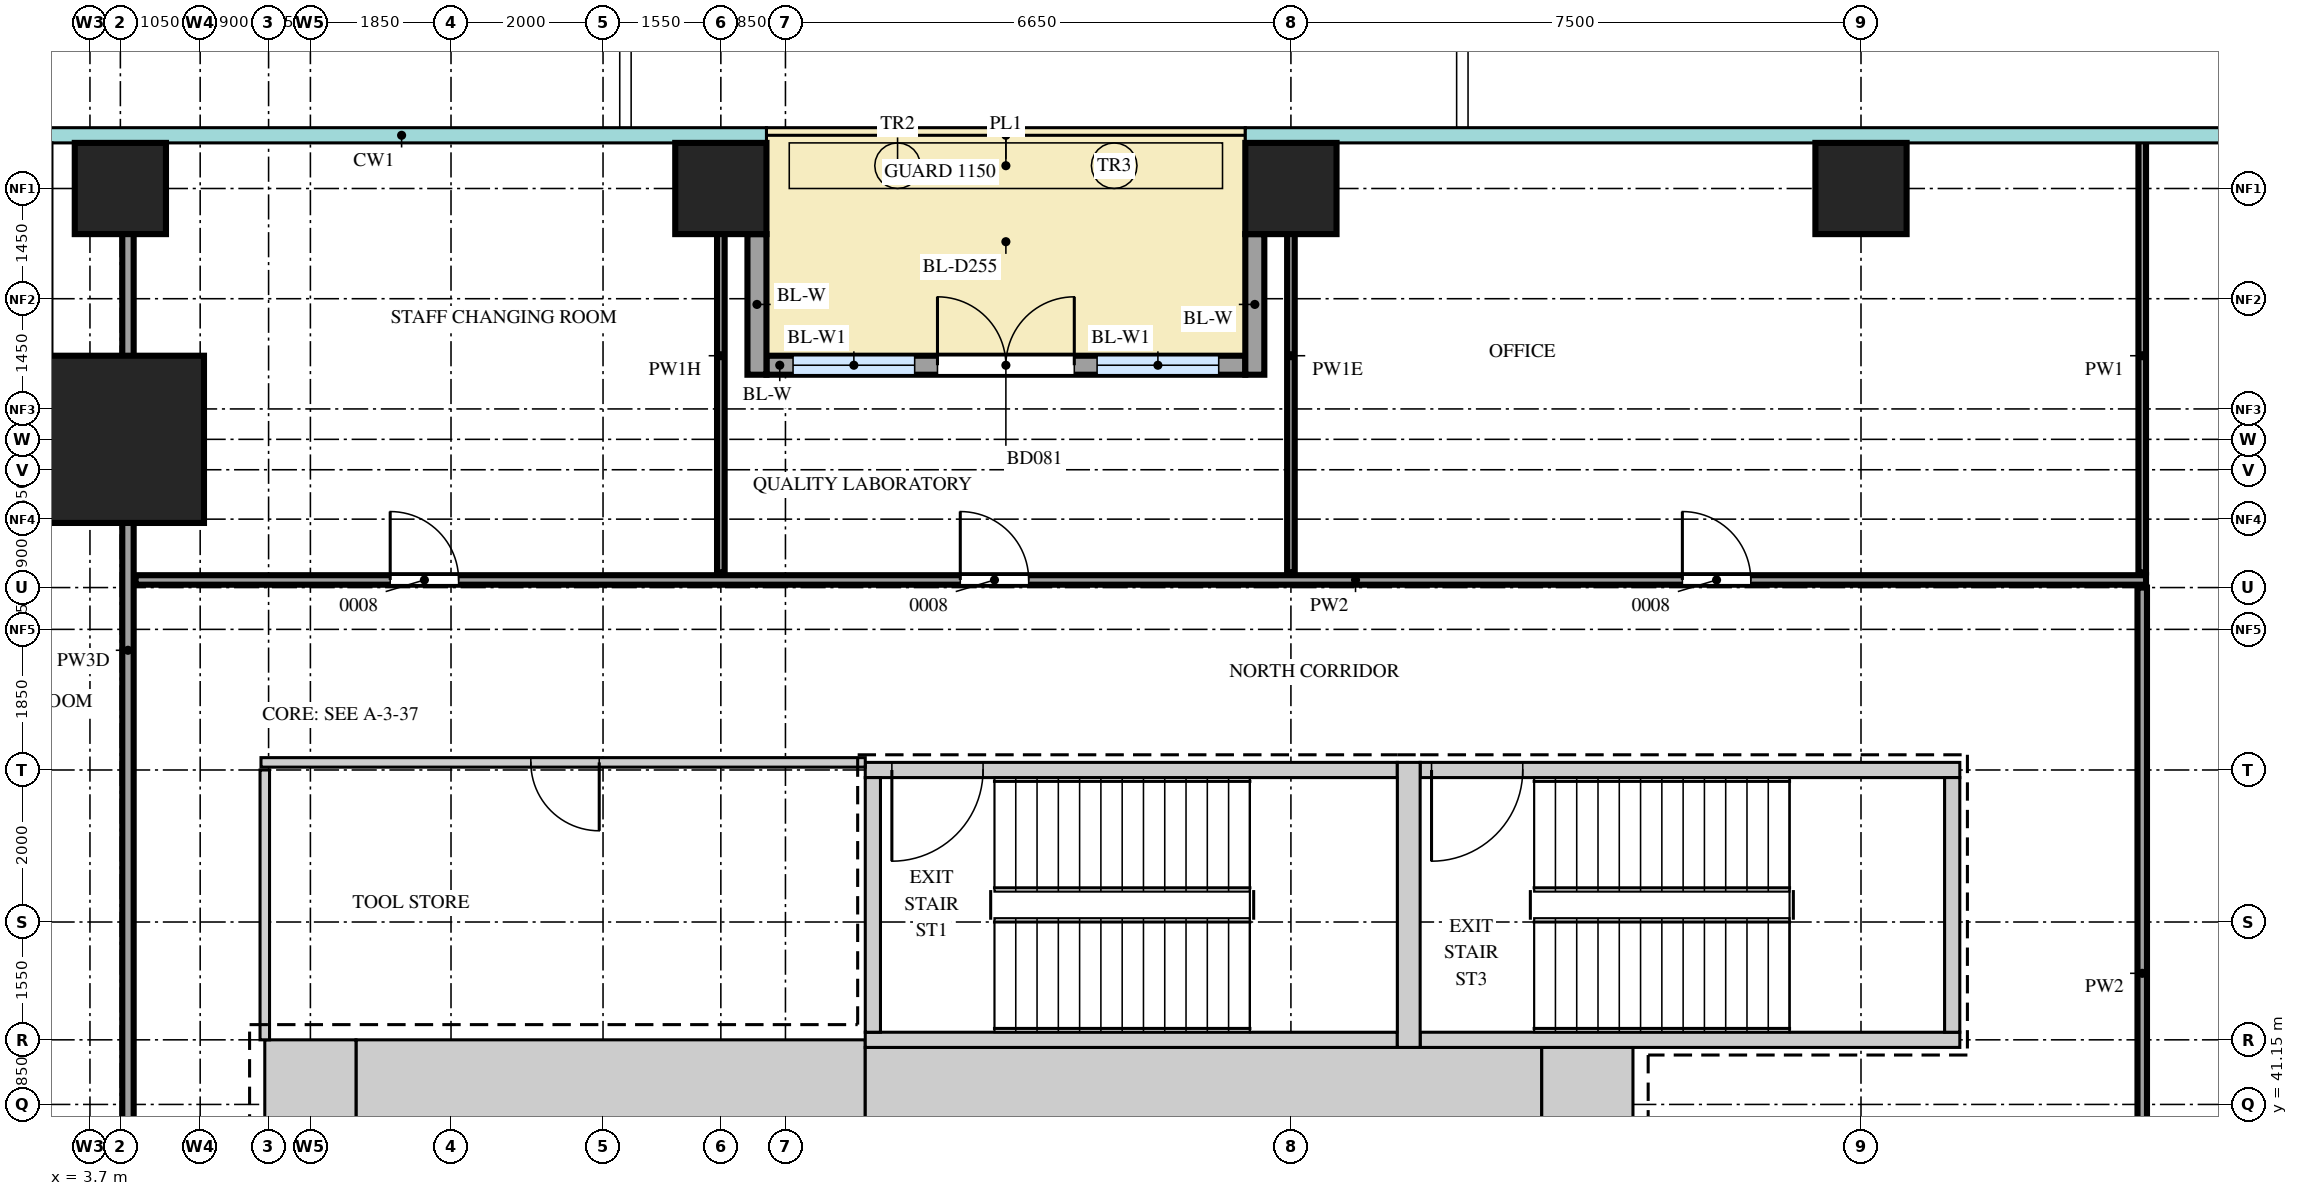
"""IFC4 building model, lengths in metres.
Left out: names, types, materials, properties, quantities, classifications, styles, units other than length and angle.
Written with IfcOpenShell. Run it as: python <this file> out.ifc"""

import sys

from ifc_helpers import new_model, si_unit, direction, frame, frame_2d, origin, origin_2d, place, context, subcontext, project, spatial, rectangle, extrude, source, transform, mapped, element, fill, save


model = new_model("IFC4")
c1 = context("Model", 3, precision=1e-05, world=origin(), true_north=direction((0.0, 1.0)))
c2 = subcontext(c1, "Body", "Model", "MODEL_VIEW")
j1 = project(units=[si_unit("LENGTHUNIT", "METRE"), si_unit("PLANEANGLEUNIT", "RADIAN")], contexts=[c1])
p1 = place(None, origin())
s1 = spatial("IfcSite", under=j1, at=p1, CompositionType="ELEMENT")
p2 = place(p1, origin())
s2 = spatial("IfcBuilding", under=s1, at=p2, CompositionType="ELEMENT")
p3 = place(p2, frame((0.0, 0.0, 42.0)))
s3 = spatial("IfcBuildingStorey", under=s2, at=p3, CompositionType="ELEMENT", Elevation=42.0)
m1 = source(origin(), c2, "Body", "SweptSolid", [
    extrude(rectangle(XDim=6.7, YDim=1.2, at=frame_2d((3.35, 0.0))), origin(), (0.0, 0.0, 1.0), 4.2),
])
p4 = place(p3, frame((7.2, 41.4, 0.0), z_axis=(0.0, 0.0, 1.0), x_axis=(1.0, 0.0, 0.0)))
e1 = element("IfcWall", 1, at=p4, inside=s3, PredefinedType="SHEAR", context=c2, shape_type="MappedRepresentation", body=[
    mapped(m1, transform((0.0, 0.0, 0.0))),
])
m2 = source(origin(), c2, "Body", "SweptSolid", [
    extrude(rectangle(XDim=8.9, YDim=1.1, at=frame_2d((4.45, 0.0))), origin(), (0.0, 0.0, 1.0), 4.2),
])
p5 = place(p3, frame((13.9, 41.35, 0.0), z_axis=(0.0, 0.0, 1.0), x_axis=(1.0, 0.0, 0.0)))
e2 = element("IfcWall", 2, at=p5, inside=s3, PredefinedType="SHEAR", context=c2, shape_type="MappedRepresentation", body=[
    mapped(m2, transform((0.0, 0.0, 0.0))),
])
m3 = source(origin(), c2, "Body", "SweptSolid", [
    extrude(rectangle(XDim=1.2, YDim=1.1, at=frame_2d((0.6, 0.0))), origin(), (0.0, 0.0, 1.0), 4.2),
])
p6 = place(p3, frame((22.8, 41.35, 0.0), z_axis=(0.0, 0.0, 1.0), x_axis=(1.0, 0.0, 0.0)))
e3 = element("IfcWall", 3, at=p6, inside=s3, PredefinedType="SHEAR", context=c2, shape_type="MappedRepresentation", body=[
    mapped(m3, transform((0.0, 0.0, 0.0))),
])
m4 = source(origin(), c2, "Body", "SweptSolid", [
    extrude(rectangle(XDim=1.2, YDim=1.2, at=frame_2d((0.6, 0.0))), origin(), (0.0, 0.0, 1.0), 4.2),
])
p7 = place(p3, frame((6.0, 41.4, 0.0), z_axis=(0.0, 0.0, 1.0), x_axis=(1.0, 0.0, 0.0)))
e4 = element("IfcWall", 4, at=p7, inside=s3, PredefinedType="SHEAR", context=c2, shape_type="MappedRepresentation", body=[
    mapped(m4, transform((0.0, 0.0, 0.0))),
])
m5 = source(origin(), c2, "Body", "SweptSolid", [
    extrude(rectangle(XDim=7.0, YDim=0.2, at=frame_2d((3.5, 0.0))), origin(), (0.0, 0.0, 1.0), 4.2),
])
p8 = place(p3, frame((13.9, 45.55, 0.0), z_axis=(0.0, 0.0, 1.0), x_axis=(1.0, 0.0, 0.0)))
e5 = element("IfcWall", 5, at=p8, inside=s3, PredefinedType="SHEAR", context=c2, shape_type="MappedRepresentation", body=[
    mapped(m5, transform((0.0, 0.0, 0.0))),
])
m6 = source(origin(), c2, "Body", "SweptSolid", [
    extrude(rectangle(XDim=1.2, YDim=2.1, at=frame_2d((0.6, 1.05))), frame((0.0, 0.11, 0.0), z_axis=(0.0, -1.0, 0.0), x_axis=(1.0, 0.0, 0.0)), (0.0, 0.0, 1.0), 0.22),
])
p9 = place(p8, frame((0.35, 0.0, 0.0)))
e6 = element("IfcOpeningElement", 6, at=p9, cuts=e5, PredefinedType="OPENING", context=c2, shape_type="MappedRepresentation", body=[
    mapped(m6, transform((0.0, 0.0, 0.0))),
])
p10 = place(p3, frame((13.9, 42.0, 0.0), z_axis=(0.0, 0.0, 1.0), x_axis=(1.0, 0.0, 0.0)))
e7 = element("IfcWall", 7, at=p10, inside=s3, PredefinedType="SHEAR", context=c2, shape_type="MappedRepresentation", body=[
    mapped(m5, transform((0.0, 0.0, 0.0))),
])
m7 = source(origin(), c2, "Body", "SweptSolid", [
    extrude(rectangle(XDim=7.1, YDim=0.2, at=frame_2d((3.55, 0.0))), origin(), (0.0, 0.0, 1.0), 4.2),
])
p11 = place(p3, frame((21.2, 45.55, 0.0), z_axis=(0.0, 0.0, 1.0), x_axis=(1.0, 0.0, 0.0)))
e8 = element("IfcWall", 8, at=p11, inside=s3, PredefinedType="SHEAR", context=c2, shape_type="MappedRepresentation", body=[
    mapped(m7, transform((0.0, 0.0, 0.0))),
])
p12 = place(p11, frame((0.15, 0.0, 0.0)))
e9 = element("IfcOpeningElement", 9, at=p12, cuts=e8, PredefinedType="OPENING", context=c2, shape_type="MappedRepresentation", body=[
    mapped(m6, transform((0.0, 0.0, 0.0))),
])
p13 = place(p3, frame((21.2, 42.0, 0.0), z_axis=(0.0, 0.0, 1.0), x_axis=(1.0, 0.0, 0.0)))
e10 = element("IfcWall", 10, at=p13, inside=s3, PredefinedType="SHEAR", context=c2, shape_type="MappedRepresentation", body=[
    mapped(m7, transform((0.0, 0.0, 0.0))),
])
m8 = source(origin(), c2, "Body", "SweptSolid", [
    extrude(rectangle(XDim=3.75, YDim=0.3, at=frame_2d((1.875, 0.0))), origin(), (0.0, 0.0, 1.0), 4.2),
])
p14 = place(p3, frame((21.05, 41.9, 0.0), z_axis=(0.0, 0.0, 1.0), x_axis=(0.0, 1.0, 0.0)))
e11 = element("IfcWall", 11, at=p14, inside=s3, PredefinedType="SHEAR", context=c2, shape_type="MappedRepresentation", body=[
    mapped(m8, transform((0.0, 0.0, 0.0))),
])
m9 = source(origin(), c2, "Body", "SweptSolid", [
    extrude(rectangle(XDim=3.35, YDim=0.2, at=frame_2d((1.675, 0.0))), origin(), (0.0, 0.0, 1.0), 4.2),
])
for number, where, z_axis, x_axis in (
    (12, (14.0, 42.1, 0.0), (0.0, 0.0, 1.0), (0.0, 1.0, 0.0)),
    (13, (28.2, 42.1, 0.0), (0.0, 0.0, 1.0), (0.0, 1.0, 0.0)),
):
    element("IfcWall", number, at=place(p3, frame(where, z_axis=z_axis, x_axis=x_axis)), inside=s3, PredefinedType="SHEAR", context=c2, shape_type="MappedRepresentation", body=[
        mapped(m9, transform((0.0, 0.0, 0.0))),
    ])
m10 = source(origin(), c2, "Body", "SweptSolid", [
    extrude(rectangle(XDim=2.2, YDim=2.2, at=origin_2d()), origin(), (0.0, 0.0, 1.0), 4.5),
])
p15 = place(p3, frame((4.1, 49.9, 0.0), z_axis=(0.0, 0.0, 1.0), x_axis=(1.0, 0.0, 0.0)))
e14 = element("IfcColumn", 14, at=p15, inside=s3, PredefinedType="COLUMN", context=c2, shape_type="MappedRepresentation", body=[
    mapped(m10, transform((0.0, 0.0, 0.0))),
])
m11 = source(origin(), c2, "Body", "SweptSolid", [
    extrude(rectangle(XDim=1.2, YDim=1.2, at=origin_2d()), origin(), (0.0, 0.0, 1.0), 4.2),
])
for number, where, z_axis, x_axis in (
    (15, (4.1, 53.2, 0.0), (0.0, 0.0, 1.0), (1.0, 0.0, 0.0)),
    (16, (12.0, 53.2, 0.0), (0.0, 0.0, 1.0), (1.0, 0.0, 0.0)),
    (17, (19.5, 53.2, 0.0), (0.0, 0.0, 1.0), (1.0, 0.0, 0.0)),
    (18, (27.0, 53.2, 0.0), (0.0, 0.0, 1.0), (1.0, 0.0, 0.0)),
):
    element("IfcColumn", number, at=place(p3, frame(where, z_axis=z_axis, x_axis=x_axis)), inside=s3, PredefinedType="COLUMN", context=c2, shape_type="MappedRepresentation", body=[
        mapped(m11, transform((0.0, 0.0, 0.0))),
    ])
m12 = source(origin(), c2, "Body", "SweptSolid", [
    extrude(rectangle(XDim=6.3, YDim=0.25, at=frame_2d((3.15, 0.0))), origin(), (0.0, 0.0, 1.0), 4.2),
])
p16 = place(p3, frame((12.6, 50.875, 0.0), z_axis=(0.0, 0.0, 1.0), x_axis=(1.0, 0.0, 0.0)))
e19 = element("IfcWall", 19, at=p16, inside=s3, PredefinedType="SOLIDWALL", context=c2, shape_type="MappedRepresentation", body=[
    mapped(m12, transform((0.0, 0.0, 0.0))),
])
m13 = source(origin(), c2, "Body", "SweptSolid", [
    extrude(rectangle(XDim=1.6, YDim=2.4, at=frame_2d((0.8, 1.2))), frame((0.0, 0.135, 0.0), z_axis=(0.0, -1.0, 0.0), x_axis=(1.0, 0.0, 0.0)), (0.0, 0.0, 1.0), 0.27),
])
p17 = place(p16, frame((0.35, 0.0, 0.0)))
e20 = element("IfcOpeningElement", 20, at=p17, cuts=e19, PredefinedType="OPENING", context=c2, shape_type="MappedRepresentation", body=[
    mapped(m13, transform((0.0, 0.0, 0.0))),
])
p18 = place(p16, frame((4.35, 0.0, 0.0)))
e21 = element("IfcOpeningElement", 21, at=p18, cuts=e19, PredefinedType="OPENING", context=c2, shape_type="MappedRepresentation", body=[
    mapped(m13, transform((0.0, 0.0, 0.0))),
])
m14 = source(origin(), c2, "Body", "SweptSolid", [
    extrude(rectangle(XDim=1.8, YDim=2.4, at=frame_2d((0.9, 1.2))), frame((0.0, 0.135, 0.0), z_axis=(0.0, -1.0, 0.0), x_axis=(1.0, 0.0, 0.0)), (0.0, 0.0, 1.0), 0.27),
])
p19 = place(p16, frame((2.25, 0.0, 0.0)))
e22 = element("IfcOpeningElement", 22, at=p19, cuts=e19, PredefinedType="OPENING", context=c2, shape_type="MappedRepresentation", body=[
    mapped(m14, transform((0.0, 0.0, 0.0))),
])
m15 = source(origin(), c2, "Body", "SweptSolid", [
    extrude(rectangle(XDim=1.85, YDim=0.25, at=frame_2d((0.925, 0.0))), origin(), (0.0, 0.0, 1.0), 4.2),
])
for number, where, z_axis, x_axis in (
    (23, (12.475, 52.6, 0.0), (0.0, 0.0, 1.0), (0.0, -1.0, 0.0)),
    (24, (19.025, 52.6, 0.0), (0.0, 0.0, 1.0), (0.0, -1.0, 0.0)),
):
    element("IfcWall", number, at=place(p3, frame(where, z_axis=z_axis, x_axis=x_axis)), inside=s3, PredefinedType="SOLIDWALL", context=c2, shape_type="MappedRepresentation", body=[
        mapped(m15, transform((0.0, 0.0, 0.0))),
    ])
m16 = source(origin(), c2, "Body", "SweptSolid", [
    extrude(rectangle(XDim=19.75, YDim=0.15, at=frame_2d((9.875, 0.0))), origin(), (0.0, 0.0, 1.0), 3.6),
])
p20 = place(p3, frame((4.2, 34.1, 0.0), z_axis=(0.0, 0.0, 1.0), x_axis=(0.0, 1.0, 0.0)))
e25 = element("IfcWall", 25, at=p20, inside=s3, PredefinedType="PARTITIONING", context=c2, shape_type="MappedRepresentation", body=[
    mapped(m16, transform((0.0, 0.0, 0.0))),
])
m17 = source(origin(), c2, "Body", "SweptSolid", [
    extrude(rectangle(XDim=0.9, YDim=2.1, at=frame_2d((0.45, 1.05))), frame((0.0, 0.085, 0.0), z_axis=(0.0, -1.0, 0.0), x_axis=(1.0, 0.0, 0.0)), (0.0, 0.0, 1.0), 0.17),
])
p21 = place(p20, frame((5.4, 0.0, 0.0)))
e26 = element("IfcOpeningElement", 26, at=p21, cuts=e25, PredefinedType="OPENING", context=c2, shape_type="MappedRepresentation", body=[
    mapped(m17, transform((0.0, 0.0, 0.0))),
])
m18 = source(origin(), c2, "Body", "SweptSolid", [
    extrude(rectangle(XDim=10.15, YDim=0.125, at=frame_2d((5.075, 0.0))), origin(), (0.0, 0.0, 1.0), 4.3),
])
p22 = place(p3, frame((30.7, 37.8, 0.0), z_axis=(0.0, 0.0, 1.0), x_axis=(0.0, 1.0, 0.0)))
e27 = element("IfcWall", 27, at=p22, inside=s3, PredefinedType="PARTITIONING", context=c2, shape_type="MappedRepresentation", body=[
    mapped(m18, transform((0.0, 0.0, 0.0))),
])
m19 = source(origin(), c2, "Body", "SweptSolid", [
    extrude(rectangle(XDim=3.55, YDim=0.125, at=frame_2d((1.775, 0.0))), origin(), (0.0, 0.0, 1.0), 4.3),
])
p23 = place(p3, frame((6.0, 42.0, 0.0), z_axis=(0.0, 0.0, 1.0), x_axis=(0.0, 1.0, 0.0)))
e28 = element("IfcWall", 28, at=p23, inside=s3, PredefinedType="PARTITIONING", context=c2, shape_type="MappedRepresentation", body=[
    mapped(m19, transform((0.0, 0.0, 0.0))),
])
m20 = source(origin(), c2, "Body", "SweptSolid", [
    extrude(rectangle(XDim=7.95, YDim=0.125, at=frame_2d((3.975, 0.0))), origin(), (0.0, 0.0, 1.0), 4.3),
])
p24 = place(p3, frame((5.95, 45.65, 0.0), z_axis=(0.0, 0.0, 1.0), x_axis=(1.0, 0.0, 0.0)))
e29 = element("IfcWall", 29, at=p24, inside=s3, PredefinedType="PARTITIONING", context=c2, shape_type="MappedRepresentation", body=[
    mapped(m20, transform((0.0, 0.0, 0.0))),
])
m21 = source(origin(), c2, "Body", "SweptSolid", [
    extrude(rectangle(XDim=0.9, YDim=2.1, at=frame_2d((0.45, 1.05))), frame((0.0, 0.073, 0.0), z_axis=(0.0, -1.0, 0.0), x_axis=(1.0, 0.0, 0.0)), (0.0, 0.0, 1.0), 0.145),
])
p25 = place(p24, frame((3.55, 0.0, 0.0)))
e30 = element("IfcOpeningElement", 30, at=p25, cuts=e29, PredefinedType="OPENING", context=c2, shape_type="MappedRepresentation", body=[
    mapped(m21, transform((0.0, 0.0, 0.0))),
])
m22 = source(origin(), c2, "Body", "SweptSolid", [
    extrude(rectangle(XDim=26.45, YDim=0.125, at=frame_2d((13.225, 0.0))), origin(), (0.0, 0.0, 1.0), 4.3),
])
p26 = place(p3, frame((4.3, 48.05, 0.0), z_axis=(0.0, 0.0, 1.0), x_axis=(1.0, 0.0, 0.0)))
e31 = element("IfcWall", 31, at=p26, inside=s3, PredefinedType="PARTITIONING", context=c2, shape_type="MappedRepresentation", body=[
    mapped(m22, transform((0.0, 0.0, 0.0))),
])
p27 = place(p26, frame((3.35, 0.0, 0.0)))
e32 = element("IfcOpeningElement", 32, at=p27, cuts=e31, PredefinedType="OPENING", context=c2, shape_type="MappedRepresentation", body=[
    mapped(m21, transform((0.0, 0.0, 0.0))),
])
p28 = place(p26, frame((10.85, 0.0, 0.0)))
e33 = element("IfcOpeningElement", 33, at=p28, cuts=e31, PredefinedType="OPENING", context=c2, shape_type="MappedRepresentation", body=[
    mapped(m21, transform((0.0, 0.0, 0.0))),
])
p29 = place(p26, frame((20.35, 0.0, 0.0)))
e34 = element("IfcOpeningElement", 34, at=p29, cuts=e31, PredefinedType="OPENING", context=c2, shape_type="MappedRepresentation", body=[
    mapped(m21, transform((0.0, 0.0, 0.0))),
])
m23 = source(origin(), c2, "Body", "SweptSolid", [
    extrude(rectangle(XDim=5.7, YDim=0.1, at=frame_2d((2.85, 0.0))), origin(), (0.0, 0.0, 1.0), 3.7),
])
p30 = place(p3, frame((12.0, 48.15, 0.0), z_axis=(0.0, 0.0, 1.0), x_axis=(0.0, 1.0, 0.0)))
e35 = element("IfcWall", 35, at=p30, inside=s3, PredefinedType="PARTITIONING", context=c2, shape_type="MappedRepresentation", body=[
    mapped(m23, transform((0.0, 0.0, 0.0))),
])
m24 = source(origin(), c2, "Body", "SweptSolid", [
    extrude(rectangle(XDim=5.7, YDim=0.1, at=frame_2d((2.85, 0.0))), origin(), (0.0, 0.0, 1.0), 3.84),
])
p31 = place(p3, frame((19.5, 48.15, 0.0), z_axis=(0.0, 0.0, 1.0), x_axis=(0.0, 1.0, 0.0)))
e36 = element("IfcWall", 36, at=p31, inside=s3, PredefinedType="PARTITIONING", context=c2, shape_type="MappedRepresentation", body=[
    mapped(m24, transform((0.0, 0.0, 0.0))),
])
m25 = source(origin(), c2, "Body", "SweptSolid", [
    extrude(rectangle(XDim=5.7, YDim=0.1, at=frame_2d((2.85, 0.0))), origin(), (0.0, 0.0, 1.0), 4.3),
])
p32 = place(p3, frame((30.7, 48.15, 0.0), z_axis=(0.0, 0.0, 1.0), x_axis=(0.0, 1.0, 0.0)))
e37 = element("IfcWall", 37, at=p32, inside=s3, PredefinedType="PARTITIONING", context=c2, shape_type="MappedRepresentation", body=[
    mapped(m25, transform((0.0, 0.0, 0.0))),
])
m26 = source(origin(), c2, "Body", "SweptSolid", [
    extrude(rectangle(XDim=1.6, YDim=2.4, at=frame_2d((0.8, 1.2))), frame((0.0, 0.03, 0.0), z_axis=(0.0, -1.0, 0.0), x_axis=(1.0, 0.0, 0.0)), (0.0, 0.0, 1.0), 0.06),
])
p33 = place(p17, origin())
e38 = element("IfcWindow", 38, at=p33, inside=s3, PartitioningType="SINGLE_PANEL", PredefinedType="WINDOW", context=c2, shape_type="MappedRepresentation", body=[
    mapped(m26, transform((0.0, 0.0, 0.0))),
])
fill(e20, e38)
p34 = place(p18, origin())
e39 = element("IfcWindow", 39, at=p34, inside=s3, PartitioningType="SINGLE_PANEL", PredefinedType="WINDOW", context=c2, shape_type="MappedRepresentation", body=[
    mapped(m26, transform((0.0, 0.0, 0.0))),
])
fill(e21, e39)
m27 = source(origin(), c2, "Body", "SweptSolid", [
    extrude(rectangle(XDim=1.8, YDim=2.4, at=frame_2d((0.9, 1.2))), frame((0.0, 0.025, 0.0), z_axis=(0.0, -1.0, 0.0), x_axis=(1.0, 0.0, 0.0)), (0.0, 0.0, 1.0), 0.05),
])
p35 = place(p19, origin())
e40 = element("IfcDoor", 40, at=p35, inside=s3, OperationType="DOUBLE_DOOR_DOUBLE_SWING", PredefinedType="DOOR", context=c2, shape_type="MappedRepresentation", body=[
    mapped(m27, transform((0.0, 0.0, 0.0))),
])
fill(e22, e40)
m28 = source(origin(), c2, "Body", "SweptSolid", [
    extrude(rectangle(XDim=0.9, YDim=2.1, at=frame_2d((0.45, 1.05))), frame((0.0, 0.025, 0.0), z_axis=(0.0, -1.0, 0.0), x_axis=(1.0, 0.0, 0.0)), (0.0, 0.0, 1.0), 0.05),
])
p36 = place(p27, origin())
e41 = element("IfcDoor", 41, at=p36, inside=s3, OperationType="SINGLE_SWING_RIGHT", PredefinedType="DOOR", context=c2, shape_type="MappedRepresentation", body=[
    mapped(m28, transform((0.0, 0.0, 0.0))),
])
fill(e32, e41)
p37 = place(p28, origin())
e42 = element("IfcDoor", 42, at=p37, inside=s3, OperationType="SINGLE_SWING_RIGHT", PredefinedType="DOOR", context=c2, shape_type="MappedRepresentation", body=[
    mapped(m28, transform((0.0, 0.0, 0.0))),
])
fill(e33, e42)
p38 = place(p29, origin())
e43 = element("IfcDoor", 43, at=p38, inside=s3, OperationType="SINGLE_SWING_RIGHT", PredefinedType="DOOR", context=c2, shape_type="MappedRepresentation", body=[
    mapped(m28, transform((0.0, 0.0, 0.0))),
])
fill(e34, e43)
p39 = place(p25, origin())
e44 = element("IfcDoor", 44, at=p39, inside=s3, OperationType="SINGLE_SWING_RIGHT", PredefinedType="DOOR", context=c2, shape_type="MappedRepresentation", body=[
    mapped(m28, transform((0.0, 0.0, 0.0))),
])
fill(e30, e44)
m29 = source(origin(), c2, "Body", "SweptSolid", [
    extrude(rectangle(XDim=1.2, YDim=2.1, at=frame_2d((0.6, 1.05))), frame((0.0, 0.025, 0.0), z_axis=(0.0, -1.0, 0.0), x_axis=(1.0, 0.0, 0.0)), (0.0, 0.0, 1.0), 0.05),
])
p40 = place(p9, origin())
e45 = element("IfcDoor", 45, at=p40, inside=s3, OperationType="SINGLE_SWING_LEFT", PredefinedType="DOOR", context=c2, shape_type="MappedRepresentation", body=[
    mapped(m29, transform((0.0, 0.0, 0.0))),
])
fill(e6, e45)
p41 = place(p12, origin())
e46 = element("IfcDoor", 46, at=p41, inside=s3, OperationType="SINGLE_SWING_LEFT", PredefinedType="DOOR", context=c2, shape_type="MappedRepresentation", body=[
    mapped(m29, transform((0.0, 0.0, 0.0))),
])
fill(e9, e46)
save(model, sys.argv[1])
